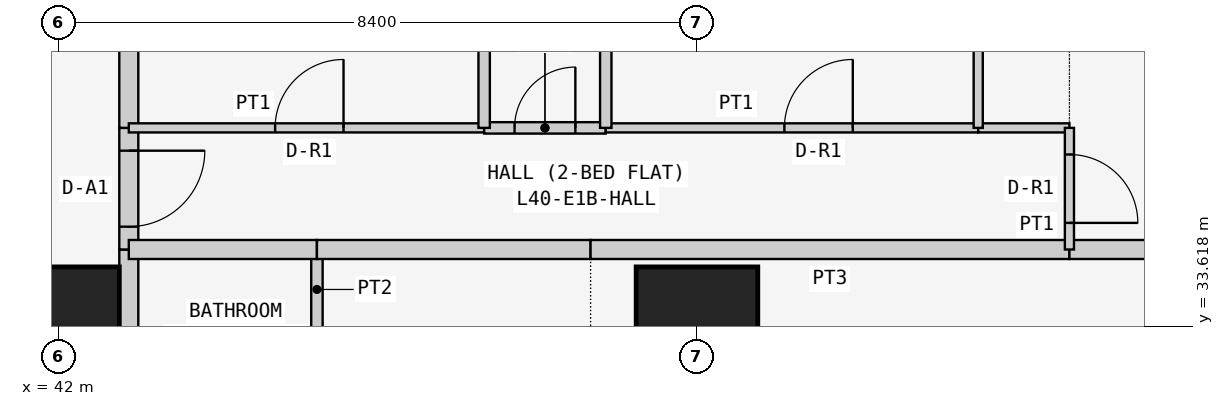
"""IFC4 building model, lengths in metres.
Left out: names, types, materials, properties, quantities, classifications, styles, units other than length and angle.
Written with IfcOpenShell. Run it as: python <this file> out.ifc"""

import sys

from ifc_helpers import new_model, si_unit, direction, frame, frame_2d, origin, origin_2d, place, context, subcontext, project, spatial, rectangle, extrude, element, fill, save


model = new_model("IFC4")
c1 = context("Model", 3, precision=1e-05, world=origin(), true_north=direction((0.0, 1.0)))
c2 = subcontext(c1, "Body", "Model", "MODEL_VIEW")
j1 = project(units=[si_unit("LENGTHUNIT", "METRE"), si_unit("PLANEANGLEUNIT", "RADIAN")], contexts=[c1])
p1 = place(None, origin())
s1 = spatial("IfcSite", under=j1, at=p1, CompositionType="ELEMENT")
p2 = place(p1, origin())
s2 = spatial("IfcBuilding", under=s1, at=p2, CompositionType="ELEMENT")
p3 = place(p2, frame((0.0, 0.0, 155.7)))
s3 = spatial("IfcBuildingStorey", under=s2, at=p3, CompositionType="ELEMENT", Elevation=155.7)
for number, where, z_axis, x_axis in (
    (1, (42.0, 33.6, 0.0), (0.0, 0.0, 1.0), (1.0, 0.0, 0.0)),
    (2, (50.4, 33.6, 0.0), (0.0, 0.0, 1.0), (1.0, 0.0, 0.0)),
):
    element("IfcColumn", number, at=place(p3, frame(where, z_axis=z_axis, x_axis=x_axis)), inside=s3, PredefinedType="COLUMN", context=c2, shape_type="SweptSolid", body=[
        extrude(rectangle(XDim=1.6, YDim=1.6, at=origin_2d()), origin(), (0.0, 0.0, 1.0), 3.6),
    ])
p4 = place(p3, frame((42.925, 34.629, 0.0), z_axis=(0.0, 0.0, 1.0), x_axis=(0.0, -1.0, 0.0)))
e3 = element("IfcWall", 3, at=p4, inside=s3, PredefinedType="PARTITIONING", context=c2, shape_type="SweptSolid", body=[
    extrude(rectangle(XDim=2.629, YDim=0.25, at=frame_2d((1.314, 0.0))), origin(), (0.0, 0.0, 1.0), 3.45),
])
p5 = place(p3, frame((42.925, 36.229, 0.0), z_axis=(0.0, 0.0, 1.0), x_axis=(0.0, -1.0, 0.0)))
e4 = element("IfcWall", 4, at=p5, inside=s3, PredefinedType="PARTITIONING", context=c2, shape_type="SweptSolid", body=[
    extrude(rectangle(XDim=1.6, YDim=0.25, at=frame_2d((0.8, 0.0))), origin(), (0.0, 0.0, 1.0), 3.45),
])
p6 = place(p5, frame((0.3, 0.0, 0.0)))
e5 = element("IfcOpeningElement", 5, at=p6, cuts=e4, PredefinedType="OPENING", context=c2, shape_type="SweptSolid", body=[
    extrude(rectangle(XDim=1.0, YDim=2.1, at=frame_2d((0.5, 1.05))), frame((0.0, 0.135, 0.0), z_axis=(0.0, -1.0, 0.0), x_axis=(1.0, 0.0, 0.0)), (0.0, 0.0, 1.0), 0.27),
])
p7 = place(p3, frame((42.925, 42.7, 0.0), z_axis=(0.0, 0.0, 1.0), x_axis=(0.0, -1.0, 0.0)))
e6 = element("IfcWall", 6, at=p7, inside=s3, PredefinedType="PARTITIONING", context=c2, shape_type="SweptSolid", body=[
    extrude(rectangle(XDim=6.471, YDim=0.25, at=frame_2d((3.235, 0.0))), origin(), (0.0, 0.0, 1.0), 3.45),
])
p8 = place(p3, frame((45.4, 32.0, 0.0), z_axis=(0.0, 0.0, 1.0), x_axis=(0.0, 1.0, 0.0)))
e7 = element("IfcWall", 7, at=p8, inside=s3, PredefinedType="PARTITIONING", context=c2, shape_type="SweptSolid", body=[
    extrude(rectangle(XDim=2.629, YDim=0.15, at=frame_2d((1.314, 0.0))), origin(), (0.0, 0.0, 1.0), 3.45),
])
p9 = place(p3, frame((45.4, 34.629, 0.0), z_axis=(0.0, 0.0, 1.0), x_axis=(-1.0, 0.0, 0.0)))
e8 = element("IfcWall", 8, at=p9, inside=s3, PredefinedType="PARTITIONING", context=c2, shape_type="SweptSolid", body=[
    extrude(rectangle(XDim=2.475, YDim=0.25, at=frame_2d((1.237, 0.0))), origin(), (0.0, 0.0, 1.0), 3.45),
])
p10 = place(p3, frame((49.0, 34.629, 0.0), z_axis=(0.0, 0.0, 1.0), x_axis=(-1.0, 0.0, 0.0)))
e9 = element("IfcWall", 9, at=p10, inside=s3, PredefinedType="PARTITIONING", context=c2, shape_type="SweptSolid", body=[
    extrude(rectangle(XDim=3.6, YDim=0.25, at=frame_2d((1.8, 0.0))), origin(), (0.0, 0.0, 1.0), 3.45),
])
p11 = place(p3, frame((55.3, 34.629, 0.0), z_axis=(0.0, 0.0, 1.0), x_axis=(-1.0, 0.0, 0.0)))
e10 = element("IfcWall", 10, at=p11, inside=s3, PredefinedType="PARTITIONING", context=c2, shape_type="SweptSolid", body=[
    extrude(rectangle(XDim=6.3, YDim=0.25, at=frame_2d((3.15, 0.0))), origin(), (0.0, 0.0, 1.0), 3.45),
])
p12 = place(p3, frame((59.45, 34.629, 0.0), z_axis=(0.0, 0.0, 1.0), x_axis=(-1.0, 0.0, 0.0)))
e11 = element("IfcWall", 11, at=p12, inside=s3, PredefinedType="PARTITIONING", context=c2, shape_type="SweptSolid", body=[
    extrude(rectangle(XDim=4.15, YDim=0.25, at=frame_2d((2.075, 0.0))), origin(), (0.0, 0.0, 1.0), 3.45),
])
p13 = place(p3, frame((47.6, 36.229, 0.0), z_axis=(0.0, 0.0, 1.0), x_axis=(-1.0, 0.0, 0.0)))
e12 = element("IfcWall", 12, at=p13, inside=s3, PredefinedType="PARTITIONING", context=c2, shape_type="SweptSolid", body=[
    extrude(rectangle(XDim=4.675, YDim=0.12, at=frame_2d((2.337, 0.0))), origin(), (0.0, 0.0, 1.0), 3.45),
])
p14 = place(p13, frame((1.85, 0.0, 0.0)))
e13 = element("IfcOpeningElement", 13, at=p14, cuts=e12, PredefinedType="OPENING", context=c2, shape_type="SweptSolid", body=[
    extrude(rectangle(XDim=0.9, YDim=2.1, at=frame_2d((0.45, 1.05))), frame((0.0, 0.07, 0.0), z_axis=(0.0, -1.0, 0.0), x_axis=(1.0, 0.0, 0.0)), (0.0, 0.0, 1.0), 0.14),
])
p15 = place(p3, frame((49.2, 36.229, 0.0), z_axis=(0.0, 0.0, 1.0), x_axis=(-1.0, 0.0, 0.0)))
e14 = element("IfcWall", 14, at=p15, inside=s3, PredefinedType="PARTITIONING", context=c2, shape_type="SweptSolid", body=[
    extrude(rectangle(XDim=1.6, YDim=0.15, at=frame_2d((0.8, 0.0))), origin(), (0.0, 0.0, 1.0), 3.45),
])
p16 = place(p15, frame((0.4, 0.0, 0.0)))
e15 = element("IfcOpeningElement", 15, at=p16, cuts=e14, PredefinedType="OPENING", context=c2, shape_type="SweptSolid", body=[
    extrude(rectangle(XDim=0.8, YDim=2.1, at=frame_2d((0.4, 1.05))), frame((0.0, 0.085, 0.0), z_axis=(0.0, -1.0, 0.0), x_axis=(1.0, 0.0, 0.0)), (0.0, 0.0, 1.0), 0.17),
])
p17 = place(p3, frame((54.1, 36.229, 0.0), z_axis=(0.0, 0.0, 1.0), x_axis=(-1.0, 0.0, 0.0)))
e16 = element("IfcWall", 16, at=p17, inside=s3, PredefinedType="PARTITIONING", context=c2, shape_type="SweptSolid", body=[
    extrude(rectangle(XDim=4.9, YDim=0.12, at=frame_2d((2.45, 0.0))), origin(), (0.0, 0.0, 1.0), 3.45),
])
p18 = place(p17, frame((1.65, 0.0, 0.0)))
e17 = element("IfcOpeningElement", 17, at=p18, cuts=e16, PredefinedType="OPENING", context=c2, shape_type="SweptSolid", body=[
    extrude(rectangle(XDim=0.9, YDim=2.1, at=frame_2d((0.45, 1.05))), frame((0.0, 0.07, 0.0), z_axis=(0.0, -1.0, 0.0), x_axis=(1.0, 0.0, 0.0)), (0.0, 0.0, 1.0), 0.14),
])
p19 = place(p3, frame((55.3, 36.229, 0.0), z_axis=(0.0, 0.0, 1.0), x_axis=(-1.0, 0.0, 0.0)))
e18 = element("IfcWall", 18, at=p19, inside=s3, PredefinedType="PARTITIONING", context=c2, shape_type="SweptSolid", body=[
    extrude(rectangle(XDim=1.2, YDim=0.12, at=frame_2d((0.6, 0.0))), origin(), (0.0, 0.0, 1.0), 3.45),
])
p20 = place(p3, frame((55.3, 34.629, 0.0), z_axis=(0.0, 0.0, 1.0), x_axis=(0.0, 1.0, 0.0)))
e19 = element("IfcWall", 19, at=p20, inside=s3, PredefinedType="PARTITIONING", context=c2, shape_type="SweptSolid", body=[
    extrude(rectangle(XDim=1.6, YDim=0.12, at=frame_2d((0.8, 0.0))), origin(), (0.0, 0.0, 1.0), 3.45),
])
p21 = place(p20, frame((0.35, 0.0, 0.0)))
e20 = element("IfcOpeningElement", 20, at=p21, cuts=e19, PredefinedType="OPENING", context=c2, shape_type="SweptSolid", body=[
    extrude(rectangle(XDim=0.9, YDim=2.1, at=frame_2d((0.45, 1.05))), frame((0.0, 0.07, 0.0), z_axis=(0.0, -1.0, 0.0), x_axis=(1.0, 0.0, 0.0)), (0.0, 0.0, 1.0), 0.14),
])
for number, where, z_axis, x_axis in (
    (21, (47.6, 36.229, 0.0), (0.0, 0.0, 1.0), (0.0, 1.0, 0.0)),
    (22, (49.2, 36.229, 0.0), (0.0, 0.0, 1.0), (0.0, 1.0, 0.0)),
):
    element("IfcWall", number, at=place(p3, frame(where, z_axis=z_axis, x_axis=x_axis)), inside=s3, PredefinedType="PARTITIONING", context=c2, shape_type="SweptSolid", body=[
        extrude(rectangle(XDim=6.471, YDim=0.15, at=frame_2d((3.235, 0.0))), origin(), (0.0, 0.0, 1.0), 3.45),
    ])
p22 = place(p3, frame((54.1, 36.229, 0.0), z_axis=(0.0, 0.0, 1.0), x_axis=(0.0, 1.0, 0.0)))
e23 = element("IfcWall", 23, at=p22, inside=s3, PredefinedType="PARTITIONING", context=c2, shape_type="SweptSolid", body=[
    extrude(rectangle(XDim=6.471, YDim=0.12, at=frame_2d((3.235, 0.0))), origin(), (0.0, 0.0, 1.0), 3.45),
])
p23 = place(p6, origin())
e24 = element("IfcDoor", 24, at=p23, inside=s3, OperationType="SINGLE_SWING_LEFT", PredefinedType="DOOR", context=c2, shape_type="SweptSolid", body=[
    extrude(rectangle(XDim=1.0, YDim=2.1, at=frame_2d((0.5, 1.05))), frame((0.0, 0.025, 0.0), z_axis=(0.0, -1.0, 0.0), x_axis=(1.0, 0.0, 0.0)), (0.0, 0.0, 1.0), 0.05),
])
fill(e5, e24)
p24 = place(p14, frame((0.9, 0.0, 0.0), z_axis=(0.0, 0.0, 1.0), x_axis=(-1.0, 0.0, 0.0)))
e25 = element("IfcDoor", 25, at=p24, inside=s3, OperationType="SINGLE_SWING_RIGHT", PredefinedType="DOOR", context=c2, shape_type="SweptSolid", body=[
    extrude(rectangle(XDim=0.9, YDim=2.1, at=frame_2d((0.45, 1.05))), frame((0.0, 0.025, 0.0), z_axis=(0.0, -1.0, 0.0), x_axis=(1.0, 0.0, 0.0)), (0.0, 0.0, 1.0), 0.05),
])
fill(e13, e25)
p25 = place(p16, frame((0.8, 0.0, 0.0), z_axis=(0.0, 0.0, 1.0), x_axis=(-1.0, 0.0, 0.0)))
e26 = element("IfcDoor", 26, at=p25, inside=s3, OperationType="SINGLE_SWING_RIGHT", PredefinedType="DOOR", context=c2, shape_type="SweptSolid", body=[
    extrude(rectangle(XDim=0.8, YDim=2.1, at=frame_2d((0.4, 1.05))), frame((0.0, 0.025, 0.0), z_axis=(0.0, -1.0, 0.0), x_axis=(1.0, 0.0, 0.0)), (0.0, 0.0, 1.0), 0.05),
])
fill(e15, e26)
p26 = place(p18, frame((0.9, 0.0, 0.0), z_axis=(0.0, 0.0, 1.0), x_axis=(-1.0, 0.0, 0.0)))
e27 = element("IfcDoor", 27, at=p26, inside=s3, OperationType="SINGLE_SWING_RIGHT", PredefinedType="DOOR", context=c2, shape_type="SweptSolid", body=[
    extrude(rectangle(XDim=0.9, YDim=2.1, at=frame_2d((0.45, 1.05))), frame((0.0, 0.025, 0.0), z_axis=(0.0, -1.0, 0.0), x_axis=(1.0, 0.0, 0.0)), (0.0, 0.0, 1.0), 0.05),
])
fill(e17, e27)
p27 = place(p21, frame((0.9, 0.0, 0.0), z_axis=(0.0, 0.0, 1.0), x_axis=(-1.0, 0.0, 0.0)))
e28 = element("IfcDoor", 28, at=p27, inside=s3, OperationType="SINGLE_SWING_RIGHT", PredefinedType="DOOR", context=c2, shape_type="SweptSolid", body=[
    extrude(rectangle(XDim=0.9, YDim=2.1, at=frame_2d((0.45, 1.05))), frame((0.0, 0.025, 0.0), z_axis=(0.0, -1.0, 0.0), x_axis=(1.0, 0.0, 0.0)), (0.0, 0.0, 1.0), 0.05),
])
fill(e20, e28)
save(model, sys.argv[1])
